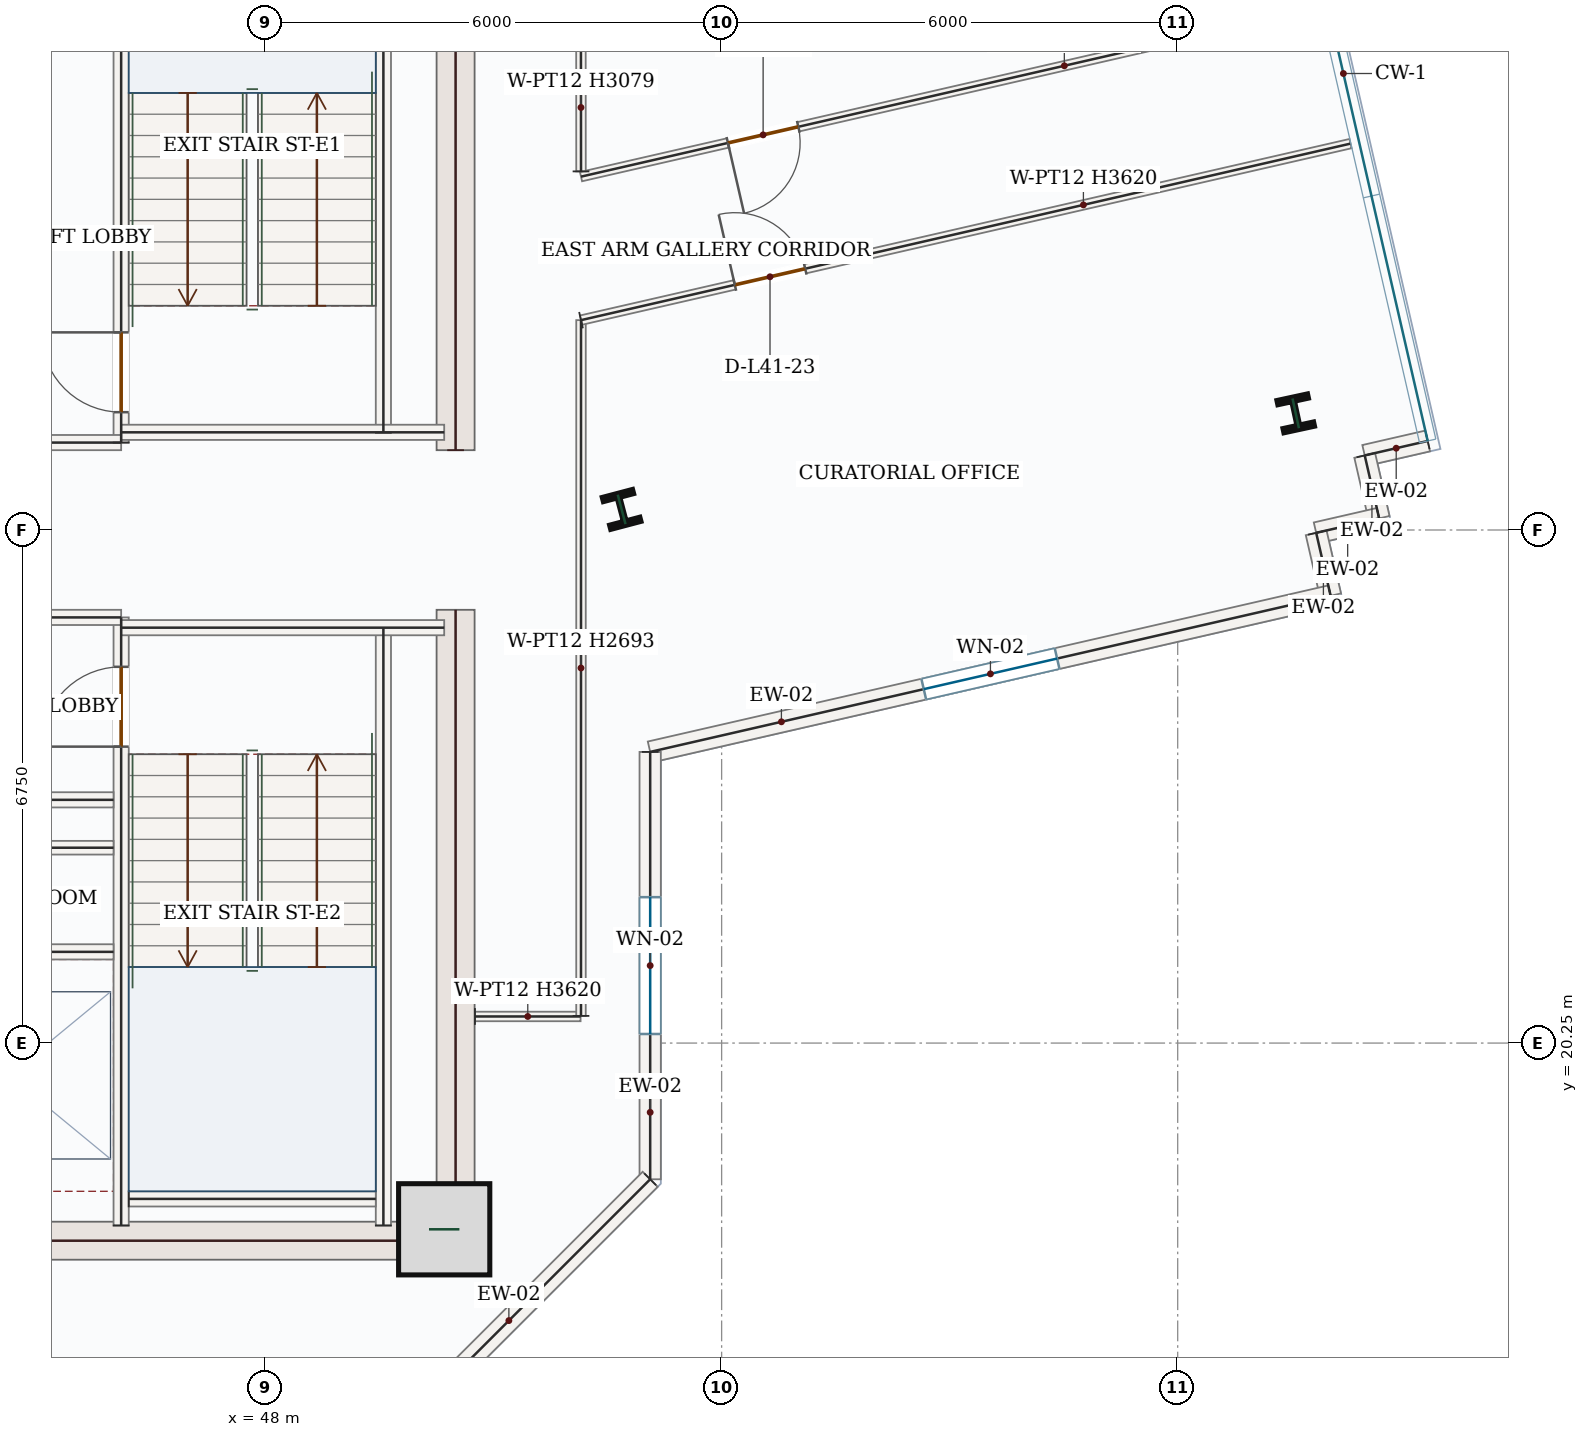
"""IFC4 building model, lengths in metres.
Left out: names, types, materials, properties, quantities, classifications, styles, units other than length and angle.
Written with IfcOpenShell. Run it as: python <this file> out.ifc"""

import sys

from ifc_helpers import new_model, si_unit, direction, frame, frame_2d, origin, origin_2d, place, context, subcontext, project, spatial, rectangle, i_section, extrude, source, transform, mapped, element, fill, save


model = new_model("IFC4")
c1 = context("Model", 3, precision=1e-05, world=origin(), true_north=direction((0.0, 1.0)))
c2 = subcontext(c1, "Body", "Model", "MODEL_VIEW")
j1 = project(units=[si_unit("LENGTHUNIT", "METRE"), si_unit("PLANEANGLEUNIT", "RADIAN")], contexts=[c1])
p1 = place(None, origin())
s1 = spatial("IfcSite", under=j1, at=p1, CompositionType="ELEMENT")
p2 = place(p1, origin())
s2 = spatial("IfcBuilding", under=s1, at=p2, CompositionType="ELEMENT")
p3 = place(p2, frame((0.0, 0.0, 178.5)))
s3 = spatial("IfcBuildingStorey", under=s2, at=p3, CompositionType="ELEMENT", Elevation=178.5)
m1 = source(origin(), c2, "Body", "SweptSolid", [
    extrude(rectangle(XDim=8.55, YDim=0.5, at=frame_2d((4.275, 0.0))), origin(), (0.0, 0.0, 1.0), 3.62),
])
for number, where, z_axis, x_axis in (
    (1, (50.5, 17.4, 0.0), (0.0, 0.0, 1.0), (0.0, 1.0, 0.0)),
    (2, (50.5, 28.05, 0.0), (0.0, 0.0, 1.0), (0.0, 1.0, 0.0)),
):
    element("IfcWall", number, at=place(p3, frame(where, z_axis=z_axis, x_axis=x_axis)), inside=s3, PredefinedType="SHEAR", context=c2, shape_type="MappedRepresentation", body=[
        mapped(m1, transform((0.0, 0.0, 0.0), x_axis=(1.0, 0.0, 0.0), y_axis=(0.0, 1.0, 0.0), z_axis=(0.0, 0.0, 1.0), scale=1.0)),
    ])
m2 = source(origin(), c2, "Body", "SweptSolid", [
    extrude(rectangle(XDim=7.0, YDim=0.5, at=frame_2d((3.5, 0.0))), origin(), (0.0, 0.0, 1.0), 3.62),
])
p4 = place(p3, frame((43.25, 17.65, 0.0), z_axis=(0.0, 0.0, 1.0), x_axis=(1.0, 0.0, 0.0)))
e3 = element("IfcWall", 3, at=p4, inside=s3, PredefinedType="SHEAR", context=c2, shape_type="MappedRepresentation", body=[
    mapped(m2, transform((0.0, 0.0, 0.0), x_axis=(1.0, 0.0, 0.0), y_axis=(0.0, 1.0, 0.0), z_axis=(0.0, 0.0, 1.0), scale=1.0)),
])
m3 = source(origin(), c2, "Body", "SweptSolid", [
    extrude(rectangle(XDim=1.2, YDim=1.2, at=origin_2d()), origin(), (0.0, 0.0, 1.0), 3.9),
])
p5 = place(p3, frame((50.35, 17.8, 0.0), z_axis=(0.0, 0.0, 1.0), x_axis=(1.0, 0.0, 0.0)))
e4 = element("IfcColumn", 4, at=p5, inside=s3, PredefinedType="COLUMN", context=c2, shape_type="MappedRepresentation", body=[
    mapped(m3, transform((0.0, 0.0, 0.0), x_axis=(1.0, 0.0, 0.0), y_axis=(0.0, 1.0, 0.0), z_axis=(0.0, 0.0, 1.0), scale=1.0)),
])
m4 = source(origin(), c2, "Body", "SweptSolid", [
    extrude(i_section(OverallWidth=0.412, OverallDepth=0.435, WebThickness=0.036, FlangeThickness=0.057, FilletRadius=0.018, at=origin_2d()), origin(), (0.0, 0.0, 1.0), 3.9),
])
for number, where, z_axis, x_axis in (
    (5, (52.684, 27.271, 0.0), (0.0, 0.0, 1.0), (0.967, 0.255, 0.0)),
    (6, (61.553, 28.535, 0.0), (0.0, 0.0, 1.0), (0.977, 0.211, 0.0)),
):
    element("IfcColumn", number, at=place(p3, frame(where, z_axis=z_axis, x_axis=x_axis)), inside=s3, PredefinedType="COLUMN", context=c2, shape_type="MappedRepresentation", body=[
        mapped(m4, transform((0.0, 0.0, 0.0), x_axis=(1.0, 0.0, 0.0), y_axis=(0.0, 1.0, 0.0), z_axis=(0.0, 0.0, 1.0), scale=1.0)),
    ])
m5 = source(origin(), c2, "Body", "SweptSolid", [
    extrude(rectangle(XDim=0.85, YDim=0.28, at=frame_2d((0.425, 0.0))), origin(), (0.0, 0.0, 1.0), 3.62),
])
p6 = place(p3, frame((63.289, 28.171, 0.0), z_axis=(0.0, 0.0, 1.0), x_axis=(-0.974704946586, -0.223495563939, 0.0)))
e7 = element("IfcWall", 7, at=p6, inside=s3, PredefinedType="SOLIDWALL", context=c2, shape_type="MappedRepresentation", body=[
    mapped(m5, transform((0.0, 0.0, 0.0), x_axis=(1.0, 0.0, 0.0), y_axis=(0.0, 1.0, 0.0), z_axis=(0.0, 0.0, 1.0), scale=1.0)),
])
m6 = source(origin(), c2, "Body", "SweptSolid", [
    extrude(rectangle(XDim=0.85, YDim=0.28, at=frame_2d((0.425, 0.0))), origin(), (0.0, 0.0, 1.0), 3.62),
])
p7 = place(p3, frame((62.461, 27.981, 0.0), z_axis=(0.0, 0.0, 1.0), x_axis=(0.22316012353, -0.974781800849, 0.0)))
e8 = element("IfcWall", 8, at=p7, inside=s3, PredefinedType="SOLIDWALL", context=c2, shape_type="MappedRepresentation", body=[
    mapped(m6, transform((0.0, 0.0, 0.0), x_axis=(1.0, 0.0, 0.0), y_axis=(0.0, 1.0, 0.0), z_axis=(0.0, 0.0, 1.0), scale=1.0)),
])
for number, where, z_axis, x_axis in (
    (9, (62.65, 27.153, 0.0), (0.0, 0.0, 1.0), (-0.975, -0.223, 0.0)),
    (10, (61.822, 26.963, 0.0), (0.0, 0.0, 1.0), (0.224, -0.975, 0.0)),
):
    element("IfcWall", number, at=place(p3, frame(where, z_axis=z_axis, x_axis=x_axis)), inside=s3, PredefinedType="SOLIDWALL", context=c2, shape_type="MappedRepresentation", body=[
        mapped(m5, transform((0.0, 0.0, 0.0), x_axis=(1.0, 0.0, 0.0), y_axis=(0.0, 1.0, 0.0), z_axis=(0.0, 0.0, 1.0), scale=1.0)),
    ])
p8 = place(p3, frame((62.012, 26.134, 0.0), z_axis=(0.0, 0.0, 1.0), x_axis=(-0.974680686557, -0.223601340005, 0.0)))
e11 = element("IfcWall", 11, at=p8, inside=s3, PredefinedType="SOLIDWALL", context=c2, shape_type="SweptSolid", body=[
    extrude(rectangle(XDim=9.185, YDim=0.28, at=frame_2d((4.592, 0.0))), origin(), (0.0, 0.0, 1.0), 3.62),
])
p9 = place(p8, frame((3.692, 0.0, 0.85)))
e12 = element("IfcOpeningElement", 12, at=p9, cuts=e11, PredefinedType="OPENING", context=c2, shape_type="SweptSolid", body=[
    extrude(rectangle(XDim=1.8, YDim=1.75, at=frame_2d((0.9, 0.875))), frame((0.0, 0.15, 0.0), z_axis=(0.0, -1.0, 0.0), x_axis=(1.0, 0.0, 0.0)), (0.0, 0.0, 1.0), 0.3),
])
p10 = place(p3, frame((53.06, 24.081, 0.0), z_axis=(0.0, 0.0, 1.0), x_axis=(0.0, -1.0, 0.0)))
e13 = element("IfcWall", 13, at=p10, inside=s3, PredefinedType="SOLIDWALL", context=c2, shape_type="SweptSolid", body=[
    extrude(rectangle(XDim=5.623, YDim=0.28, at=frame_2d((2.811, 0.0))), origin(), (0.0, 0.0, 1.0), 3.62),
])
p11 = place(p10, frame((1.911, 0.0, 0.85)))
e14 = element("IfcOpeningElement", 14, at=p11, cuts=e13, PredefinedType="OPENING", context=c2, shape_type="SweptSolid", body=[
    extrude(rectangle(XDim=1.8, YDim=1.75, at=frame_2d((0.9, 0.875))), frame((0.0, 0.15, 0.0), z_axis=(0.0, -1.0, 0.0), x_axis=(1.0, 0.0, 0.0)), (0.0, 0.0, 1.0), 0.3),
])
m7 = source(origin(), c2, "Body", "SweptSolid", [
    extrude(rectangle(XDim=5.258, YDim=0.28, at=frame_2d((2.629, 0.0))), origin(), (0.0, 0.0, 1.0), 3.62),
])
p12 = place(p3, frame((53.06, 18.458, 0.0), z_axis=(0.0, 0.0, 1.0), x_axis=(-0.707106781187, -0.707106781187, 0.0)))
e15 = element("IfcWall", 15, at=p12, inside=s3, PredefinedType="SOLIDWALL", context=c2, shape_type="MappedRepresentation", body=[
    mapped(m7, transform((0.0, 0.0, 0.0), x_axis=(1.0, 0.0, 0.0), y_axis=(0.0, 1.0, 0.0), z_axis=(0.0, 0.0, 1.0), scale=1.0)),
])
m8 = source(origin(), c2, "Body", "SweptSolid", [
    extrude(rectangle(XDim=7.87, YDim=0.2, at=frame_2d((3.935, 0.0))), origin(), (0.0, 0.0, 1.0), 3.62),
])
for number, where, z_axis, x_axis in (
    (16, (49.55, 17.85, 0.0), (0.0, 0.0, 1.0), (0.0, 1.0, 0.0)),
    (17, (49.55, 28.28, 0.0), (0.0, 0.0, 1.0), (0.0, 1.0, 0.0)),
):
    element("IfcWall", number, at=place(p3, frame(where, z_axis=z_axis, x_axis=x_axis)), inside=s3, PredefinedType="SOLIDWALL", context=c2, shape_type="MappedRepresentation", body=[
        mapped(m8, transform((0.0, 0.0, 0.0), x_axis=(1.0, 0.0, 0.0), y_axis=(0.0, 1.0, 0.0), z_axis=(0.0, 0.0, 1.0), scale=1.0)),
    ])
p13 = place(p3, frame((46.1, 17.85, 0.0), z_axis=(0.0, 0.0, 1.0), x_axis=(0.0, 1.0, 0.0)))
e18 = element("IfcWall", 18, at=p13, inside=s3, PredefinedType="SOLIDWALL", context=c2, shape_type="SweptSolid", body=[
    extrude(rectangle(XDim=8.0, YDim=0.2, at=frame_2d((4.0, 0.0))), origin(), (0.0, 0.0, 1.0), 3.62),
])
p14 = place(p13, frame((6.3, 0.0, 0.0)))
e19 = element("IfcOpeningElement", 19, at=p14, cuts=e18, PredefinedType="OPENING", context=c2, shape_type="SweptSolid", body=[
    extrude(rectangle(XDim=1.05, YDim=2.15, at=frame_2d((0.525, 1.075))), frame((0.0, 0.11, 0.0), z_axis=(0.0, -1.0, 0.0), x_axis=(1.0, 0.0, 0.0)), (0.0, 0.0, 1.0), 0.22),
])
p15 = place(p3, frame((46.1, 28.15, 0.0), z_axis=(0.0, 0.0, 1.0), x_axis=(0.0, 1.0, 0.0)))
e20 = element("IfcWall", 20, at=p15, inside=s3, PredefinedType="SOLIDWALL", context=c2, shape_type="SweptSolid", body=[
    extrude(rectangle(XDim=8.0, YDim=0.2, at=frame_2d((4.0, 0.0))), origin(), (0.0, 0.0, 1.0), 3.62),
])
p16 = place(p15, frame((0.4, 0.0, 0.0)))
e21 = element("IfcOpeningElement", 21, at=p16, cuts=e20, PredefinedType="OPENING", context=c2, shape_type="SweptSolid", body=[
    extrude(rectangle(XDim=1.05, YDim=2.15, at=frame_2d((0.525, 1.075))), frame((0.0, 0.11, 0.0), z_axis=(0.0, -1.0, 0.0), x_axis=(1.0, 0.0, 0.0)), (0.0, 0.0, 1.0), 0.22),
])
m9 = source(origin(), c2, "Body", "SweptSolid", [
    extrude(rectangle(XDim=3.0, YDim=0.2, at=frame_2d((1.5, 0.0))), origin(), (0.0, 0.0, 1.0), 3.62),
])
p17 = place(p3, frame((43.1, 25.85, 0.0), z_axis=(0.0, 0.0, 1.0), x_axis=(1.0, 0.0, 0.0)))
e22 = element("IfcWall", 22, at=p17, inside=s3, PredefinedType="SOLIDWALL", context=c2, shape_type="MappedRepresentation", body=[
    mapped(m9, transform((0.0, 0.0, 0.0), x_axis=(1.0, 0.0, 0.0), y_axis=(0.0, 1.0, 0.0), z_axis=(0.0, 0.0, 1.0), scale=1.0)),
])
m10 = source(origin(), c2, "Body", "SweptSolid", [
    extrude(rectangle(XDim=4.25, YDim=0.2, at=frame_2d((2.125, 0.0))), origin(), (0.0, 0.0, 1.0), 3.62),
])
p18 = place(p3, frame((46.1, 25.715, 0.0), z_axis=(0.0, 0.0, 1.0), x_axis=(1.0, 0.0, 0.0)))
e23 = element("IfcWall", 23, at=p18, inside=s3, PredefinedType="SOLIDWALL", context=c2, shape_type="MappedRepresentation", body=[
    mapped(m10, transform((0.0, 0.0, 0.0), x_axis=(1.0, 0.0, 0.0), y_axis=(0.0, 1.0, 0.0), z_axis=(0.0, 0.0, 1.0), scale=1.0)),
])
p19 = place(p3, frame((43.1, 28.15, 0.0), z_axis=(0.0, 0.0, 1.0), x_axis=(1.0, 0.0, 0.0)))
e24 = element("IfcWall", 24, at=p19, inside=s3, PredefinedType="SOLIDWALL", context=c2, shape_type="MappedRepresentation", body=[
    mapped(m9, transform((0.0, 0.0, 0.0), x_axis=(1.0, 0.0, 0.0), y_axis=(0.0, 1.0, 0.0), z_axis=(0.0, 0.0, 1.0), scale=1.0)),
])
p20 = place(p3, frame((46.1, 28.285, 0.0), z_axis=(0.0, 0.0, 1.0), x_axis=(1.0, 0.0, 0.0)))
e25 = element("IfcWall", 25, at=p20, inside=s3, PredefinedType="SOLIDWALL", context=c2, shape_type="MappedRepresentation", body=[
    mapped(m10, transform((0.0, 0.0, 0.0), x_axis=(1.0, 0.0, 0.0), y_axis=(0.0, 1.0, 0.0), z_axis=(0.0, 0.0, 1.0), scale=1.0)),
])
m11 = source(origin(), c2, "Body", "SweptSolid", [
    extrude(rectangle(XDim=3.25, YDim=0.2, at=frame_2d((1.625, 0.0))), origin(), (0.0, 0.0, 1.0), 3.62),
])
p21 = place(p3, frame((46.2, 18.2, 0.0), z_axis=(0.0, 0.0, 1.0), x_axis=(1.0, 0.0, 0.0)))
e26 = element("IfcWall", 26, at=p21, inside=s3, PredefinedType="SOLIDWALL", context=c2, shape_type="MappedRepresentation", body=[
    mapped(m11, transform((0.0, 0.0, 0.0), x_axis=(1.0, 0.0, 0.0), y_axis=(0.0, 1.0, 0.0), z_axis=(0.0, 0.0, 1.0), scale=1.0)),
])
m12 = source(origin(), c2, "Body", "SweptSolid", [
    extrude(rectangle(XDim=2.75, YDim=0.2, at=frame_2d((1.375, 0.0))), origin(), (0.0, 0.0, 1.0), 3.62),
])
for number, where, z_axis, x_axis in (
    (27, (43.25, 23.45, 0.0), (0.0, 0.0, 1.0), (1.0, 0.0, 0.0)),
    (28, (43.25, 21.45, 0.0), (0.0, 0.0, 1.0), (1.0, 0.0, 0.0)),
):
    element("IfcWall", number, at=place(p3, frame(where, z_axis=z_axis, x_axis=x_axis)), inside=s3, PredefinedType="SOLIDWALL", context=c2, shape_type="MappedRepresentation", body=[
        mapped(m12, transform((0.0, 0.0, 0.0), x_axis=(1.0, 0.0, 0.0), y_axis=(0.0, 1.0, 0.0), z_axis=(0.0, 0.0, 1.0), scale=1.0)),
    ])
m13 = source(origin(), c2, "Body", "SweptSolid", [
    extrude(rectangle(XDim=2.75, YDim=0.18, at=frame_2d((1.375, 0.0))), origin(), (0.0, 0.0, 1.0), 3.62),
])
p22 = place(p3, frame((43.25, 22.82, 0.0), z_axis=(0.0, 0.0, 1.0), x_axis=(1.0, 0.0, 0.0)))
e29 = element("IfcWall", 29, at=p22, inside=s3, PredefinedType="PARTITIONING", context=c2, shape_type="MappedRepresentation", body=[
    mapped(m13, transform((0.0, 0.0, 0.0), x_axis=(1.0, 0.0, 0.0), y_axis=(0.0, 1.0, 0.0), z_axis=(0.0, 0.0, 1.0), scale=1.0)),
])
m14 = source(origin(), c2, "Body", "SweptSolid", [
    extrude(rectangle(XDim=1.389, YDim=0.125, at=frame_2d((0.695, 0.0))), origin(), (0.0, 0.0, 1.0), 3.62),
])
p23 = place(p3, frame((50.755, 20.6, 0.0), z_axis=(0.0, 0.0, 1.0), x_axis=(1.0, 0.0, 0.0)))
e30 = element("IfcWall", 30, at=p23, inside=s3, PredefinedType="PARTITIONING", context=c2, shape_type="MappedRepresentation", body=[
    mapped(m14, transform((0.0, 0.0, 0.0), x_axis=(1.0, 0.0, 0.0), y_axis=(0.0, 1.0, 0.0), z_axis=(0.0, 0.0, 1.0), scale=1.0)),
])
m15 = source(origin(), c2, "Body", "SweptSolid", [
    extrude(rectangle(XDim=9.153, YDim=0.125, at=frame_2d((4.577, 0.0))), origin(), (0.0, 0.0, 1.0), 2.693),
])
p24 = place(p3, frame((52.15, 20.608, 0.0), z_axis=(0.0, 0.0, 1.0), x_axis=(2.6672357e-05, 0.999999999644, 0.0)))
e31 = element("IfcWall", 31, at=p24, inside=s3, PredefinedType="PARTITIONING", context=c2, shape_type="MappedRepresentation", body=[
    mapped(m15, transform((0.0, 0.0, 0.0), x_axis=(1.0, 0.0, 0.0), y_axis=(0.0, 1.0, 0.0), z_axis=(0.0, 0.0, 1.0), scale=1.0)),
])
p25 = place(p3, frame((52.15, 29.761, 0.0), z_axis=(0.0, 0.0, 1.0), x_axis=(0.974685490502, 0.223580398525, 0.0)))
e32 = element("IfcWall", 32, at=p25, inside=s3, PredefinedType="PARTITIONING", context=c2, shape_type="SweptSolid", body=[
    extrude(rectangle(XDim=10.387, YDim=0.125, at=frame_2d((5.193, 0.0))), origin(), (0.0, 0.0, 1.0), 3.62),
])
p26 = place(p25, frame((2.076, 0.0, 0.0)))
e33 = element("IfcOpeningElement", 33, at=p26, cuts=e32, PredefinedType="OPENING", context=c2, shape_type="SweptSolid", body=[
    extrude(rectangle(XDim=0.95, YDim=2.15, at=frame_2d((0.475, 1.075))), frame((0.0, 0.073, 0.0), z_axis=(0.0, -1.0, 0.0), x_axis=(1.0, 0.0, 0.0)), (0.0, 0.0, 1.0), 0.145),
])
p27 = place(p3, frame((61.862, 33.877, 0.0), z_axis=(0.0, 0.0, 1.0), x_axis=(-0.974682727551, -0.223592443106, 0.0)))
e34 = element("IfcWall", 34, at=p27, inside=s3, PredefinedType="PARTITIONING", context=c2, shape_type="SweptSolid", body=[
    extrude(rectangle(XDim=9.965, YDim=0.125, at=frame_2d((4.982, 0.0))), origin(), (0.0, 0.0, 1.0), 3.62),
])
p28 = place(p27, frame((7.031, 0.0, 0.0)))
e35 = element("IfcOpeningElement", 35, at=p28, cuts=e34, PredefinedType="OPENING", context=c2, shape_type="SweptSolid", body=[
    extrude(rectangle(XDim=0.95, YDim=2.15, at=frame_2d((0.475, 1.075))), frame((0.0, 0.073, 0.0), z_axis=(0.0, -1.0, 0.0), x_axis=(1.0, 0.0, 0.0)), (0.0, 0.0, 1.0), 0.145),
])
m16 = source(origin(), c2, "Body", "SweptSolid", [
    extrude(rectangle(XDim=1.681, YDim=0.125, at=frame_2d((0.84, 0.0))), origin(), (0.0, 0.0, 1.0), 3.079),
])
p29 = place(p3, frame((52.15, 31.718, 0.0), z_axis=(0.0, 0.0, 1.0), x_axis=(-0.000580973032, 0.999999831235, 0.0)))
e36 = element("IfcWall", 36, at=p29, inside=s3, PredefinedType="PARTITIONING", context=c2, shape_type="MappedRepresentation", body=[
    mapped(m16, transform((0.0, 0.0, 0.0), x_axis=(1.0, 0.0, 0.0), y_axis=(0.0, 1.0, 0.0), z_axis=(0.0, 0.0, 1.0), scale=1.0)),
])
m17 = source(origin(), c2, "Body", "SweptSolid", [
    extrude(rectangle(XDim=1.8, YDim=1.75, at=frame_2d((0.9, 0.875))), frame((0.0, 0.03, 0.0), z_axis=(0.0, -1.0, 0.0), x_axis=(1.0, 0.0, 0.0)), (0.0, 0.0, 1.0), 0.06),
])
p30 = place(p9, origin())
e37 = element("IfcWindow", 37, at=p30, inside=s3, PartitioningType="DOUBLE_PANEL_VERTICAL", PredefinedType="WINDOW", context=c2, shape_type="MappedRepresentation", body=[
    mapped(m17, transform((0.0, 0.0, 0.0), x_axis=(1.0, 0.0, 0.0), y_axis=(0.0, 1.0, 0.0), z_axis=(0.0, 0.0, 1.0), scale=1.0)),
])
fill(e12, e37)
p31 = place(p11, origin())
e38 = element("IfcWindow", 38, at=p31, inside=s3, PartitioningType="DOUBLE_PANEL_VERTICAL", PredefinedType="WINDOW", context=c2, shape_type="MappedRepresentation", body=[
    mapped(m17, transform((0.0, 0.0, 0.0), x_axis=(1.0, 0.0, 0.0), y_axis=(0.0, 1.0, 0.0), z_axis=(0.0, 0.0, 1.0), scale=1.0)),
])
fill(e14, e38)
m18 = source(origin(), c2, "Body", "SweptSolid", [
    extrude(rectangle(XDim=1.05, YDim=2.15, at=frame_2d((0.525, 1.075))), frame((0.0, 0.025, 0.0), z_axis=(0.0, -1.0, 0.0), x_axis=(1.0, 0.0, 0.0)), (0.0, 0.0, 1.0), 0.05),
])
p32 = place(p16, origin())
e39 = element("IfcDoor", 39, at=p32, inside=s3, OperationType="SINGLE_SWING_RIGHT", PredefinedType="DOOR", context=c2, shape_type="MappedRepresentation", body=[
    mapped(m18, transform((0.0, 0.0, 0.0), x_axis=(1.0, 0.0, 0.0), y_axis=(0.0, 1.0, 0.0), z_axis=(0.0, 0.0, 1.0), scale=1.0)),
])
fill(e21, e39)
p33 = place(p14, origin())
e40 = element("IfcDoor", 40, at=p33, inside=s3, OperationType="SINGLE_SWING_LEFT", PredefinedType="DOOR", context=c2, shape_type="MappedRepresentation", body=[
    mapped(m18, transform((0.0, 0.0, 0.0), x_axis=(1.0, 0.0, 0.0), y_axis=(0.0, 1.0, 0.0), z_axis=(0.0, 0.0, 1.0), scale=1.0)),
])
fill(e19, e40)
m19 = source(origin(), c2, "Body", "SweptSolid", [
    extrude(rectangle(XDim=0.95, YDim=2.15, at=frame_2d((0.475, 1.075))), frame((0.0, 0.025, 0.0), z_axis=(0.0, -1.0, 0.0), x_axis=(1.0, 0.0, 0.0)), (0.0, 0.0, 1.0), 0.05),
])
p34 = place(p26, origin())
e41 = element("IfcDoor", 41, at=p34, inside=s3, OperationType="SINGLE_SWING_LEFT", PredefinedType="DOOR", context=c2, shape_type="MappedRepresentation", body=[
    mapped(m19, transform((0.0, 0.0, 0.0), x_axis=(1.0, 0.0, 0.0), y_axis=(0.0, 1.0, 0.0), z_axis=(0.0, 0.0, 1.0), scale=1.0)),
])
fill(e33, e41)
p35 = place(p28, origin())
e42 = element("IfcDoor", 42, at=p35, inside=s3, OperationType="SINGLE_SWING_RIGHT", PredefinedType="DOOR", context=c2, shape_type="MappedRepresentation", body=[
    mapped(m19, transform((0.0, 0.0, 0.0), x_axis=(1.0, 0.0, 0.0), y_axis=(0.0, 1.0, 0.0), z_axis=(0.0, 0.0, 1.0), scale=1.0)),
])
fill(e35, e42)
save(model, sys.argv[1])
